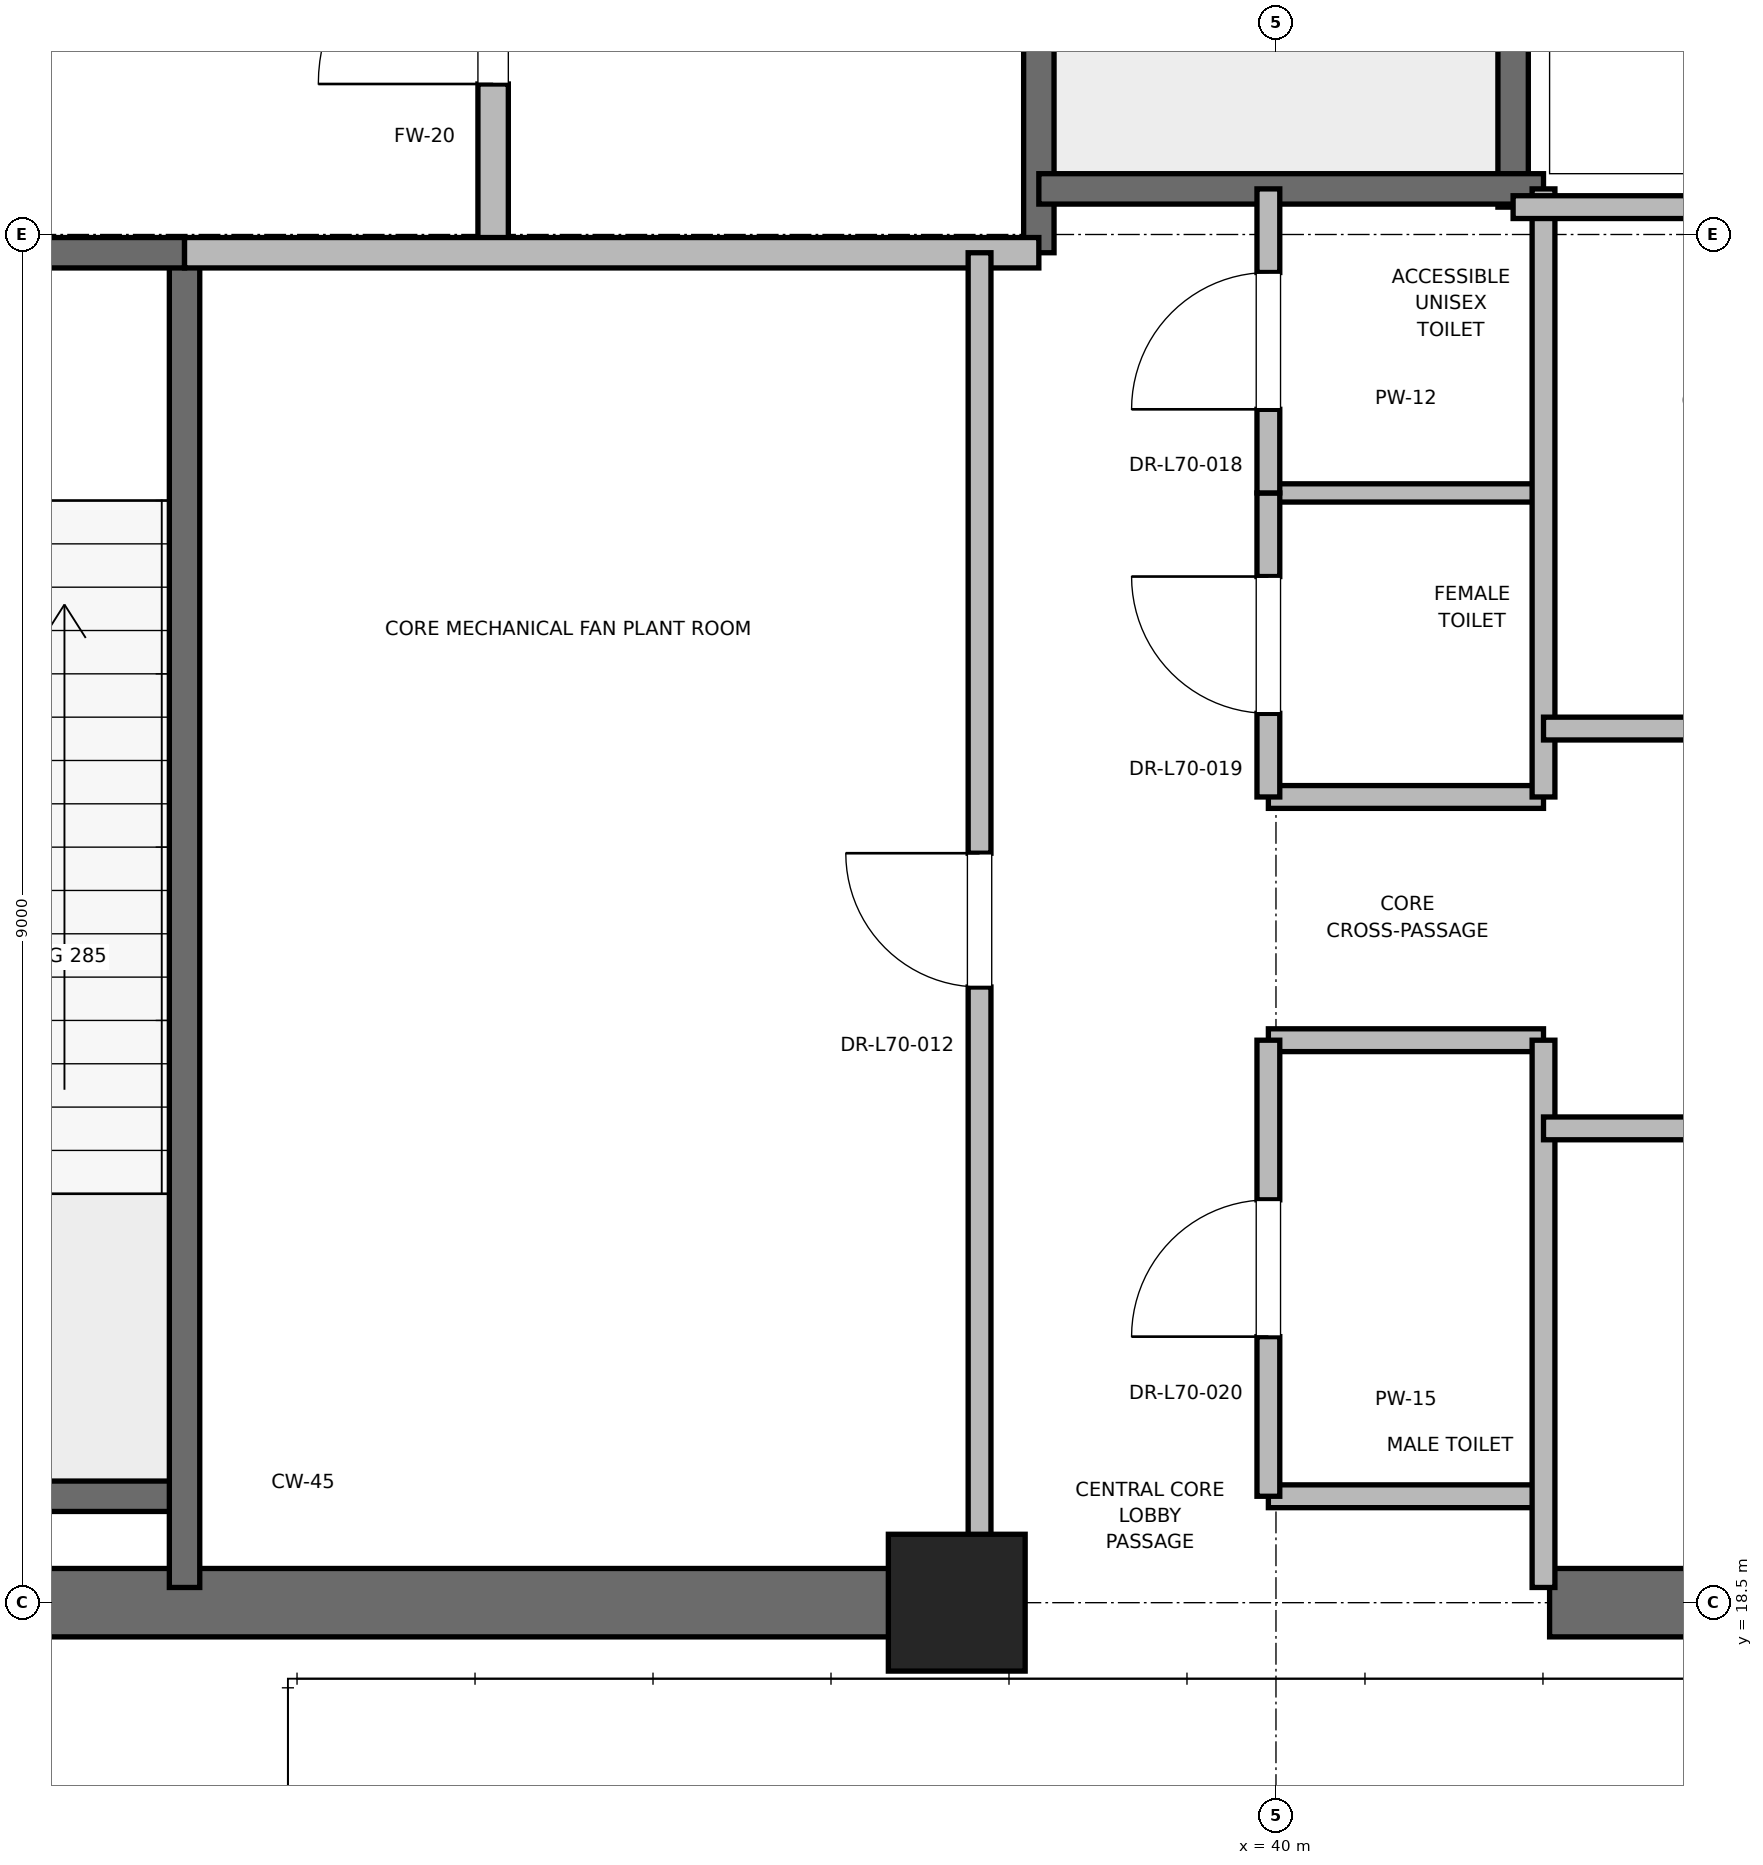
"""IFC4 building model, lengths in metres.
Left out: names, types, materials, properties, quantities, classifications, styles, units other than length and angle.
Written with IfcOpenShell. Run it as: python <this file> out.ifc"""

import sys

from ifc_helpers import new_model, si_unit, direction, frame, frame_2d, origin, origin_2d, place, context, subcontext, project, spatial, rectangle, extrude, element, fill, save


model = new_model("IFC4")
c1 = context("Model", 3, precision=1e-05, world=origin(), true_north=direction((0.0, 1.0)))
c2 = subcontext(c1, "Body", "Model", "MODEL_VIEW")
j1 = project(units=[si_unit("LENGTHUNIT", "METRE"), si_unit("PLANEANGLEUNIT", "RADIAN")], contexts=[c1])
p1 = place(None, origin())
s1 = spatial("IfcSite", under=j1, at=p1, CompositionType="ELEMENT")
p2 = place(p1, origin())
s2 = spatial("IfcBuilding", under=s1, at=p2, CompositionType="ELEMENT")
p3 = place(p2, frame((0.0, 0.0, 301.0)))
s3 = spatial("IfcBuildingStorey", under=s2, at=p3, CompositionType="ELEMENT", Elevation=301.0)
p4 = place(p3, frame((37.9, 18.5, 0.0), z_axis=(0.0, 0.0, 1.0), x_axis=(1.0, 0.0, 0.0)))
e1 = element("IfcColumn", 1, at=p4, inside=s3, PredefinedType="PILASTER", context=c2, shape_type="SweptSolid", body=[
    extrude(rectangle(XDim=0.9, YDim=0.9, at=origin_2d()), origin(), (0.0, 0.0, 1.0), 5.8),
])
for number, where, z_axis, x_axis in (
    (2, (29.0, 18.5, 0.0), (0.0, 0.0, 1.0), (1.0, 0.0, 0.0)),
    (3, (41.8, 18.5, 0.0), (0.0, 0.0, 1.0), (1.0, 0.0, 0.0)),
):
    element("IfcWall", number, at=place(p3, frame(where, z_axis=z_axis, x_axis=x_axis)), inside=s3, PredefinedType="SHEAR", context=c2, shape_type="SweptSolid", body=[
        extrude(rectangle(XDim=9.2, YDim=0.45, at=frame_2d((4.6, 0.0))), origin(), (0.0, 0.0, 1.0), 5.585),
    ])
p5 = place(p3, frame((29.7, 19.2, 0.0), z_axis=(0.0, 0.0, 1.0), x_axis=(1.0, 0.0, 0.0)))
e4 = element("IfcWall", 4, at=p5, inside=s3, PredefinedType="SOLIDWALL", context=c2, shape_type="SweptSolid", body=[
    extrude(rectangle(XDim=3.12, YDim=0.2, at=frame_2d((1.56, 0.0))), origin(), (0.0, 0.0, 1.0), 5.585),
])
p6 = place(p3, frame((32.82, 18.6, 0.0), z_axis=(0.0, 0.0, 1.0), x_axis=(0.0, 1.0, 0.0)))
e5 = element("IfcWall", 5, at=p6, inside=s3, PredefinedType="SOLIDWALL", context=c2, shape_type="SweptSolid", body=[
    extrude(rectangle(XDim=8.78, YDim=0.2, at=frame_2d((4.39, 0.0))), origin(), (0.0, 0.0, 1.0), 5.585),
])
p7 = place(p3, frame((29.7, 27.38, 0.0), z_axis=(0.0, 0.0, 1.0), x_axis=(1.0, 0.0, 0.0)))
e6 = element("IfcWall", 6, at=p7, inside=s3, PredefinedType="SOLIDWALL", context=c2, shape_type="SweptSolid", body=[
    extrude(rectangle(XDim=3.12, YDim=0.2, at=frame_2d((1.56, 0.0))), origin(), (0.0, 0.0, 1.0), 5.585),
])
p8 = place(p7, frame((1.01, 0.0, 0.0)))
e7 = element("IfcOpeningElement", 7, at=p8, cuts=e6, PredefinedType="OPENING", context=c2, shape_type="SweptSolid", body=[
    extrude(rectangle(XDim=1.1, YDim=2.15, at=frame_2d((0.55, 1.075))), frame((0.0, 0.1, 0.0), z_axis=(0.0, -1.0, 0.0), x_axis=(1.0, 0.0, 0.0)), (0.0, 0.0, 1.0), 0.2),
])
p9 = place(p3, frame((38.44, 27.38, 0.0), z_axis=(0.0, 0.0, 1.0), x_axis=(0.0, 1.0, 0.0)))
e8 = element("IfcWall", 8, at=p9, inside=s3, PredefinedType="SOLIDWALL", context=c2, shape_type="SweptSolid", body=[
    extrude(rectangle(XDim=8.87, YDim=0.2, at=frame_2d((4.435, 0.0))), origin(), (0.0, 0.0, 1.0), 5.585),
])
p10 = place(p3, frame((41.56, 27.68, 0.0), z_axis=(0.0, 0.0, 1.0), x_axis=(0.0, 1.0, 0.0)))
e9 = element("IfcWall", 9, at=p10, inside=s3, PredefinedType="SOLIDWALL", context=c2, shape_type="SweptSolid", body=[
    extrude(rectangle(XDim=8.57, YDim=0.2, at=frame_2d((4.285, 0.0))), origin(), (0.0, 0.0, 1.0), 5.585),
])
p11 = place(p3, frame((38.44, 27.8, 0.0), z_axis=(0.0, 0.0, 1.0), x_axis=(1.0, 0.0, 0.0)))
e10 = element("IfcWall", 10, at=p11, inside=s3, PredefinedType="SOLIDWALL", context=c2, shape_type="SweptSolid", body=[
    extrude(rectangle(XDim=3.32, YDim=0.2, at=frame_2d((1.66, 0.0))), origin(), (0.0, 0.0, 1.0), 5.585),
])
p12 = place(p3, frame((34.85, 27.38, 0.0), z_axis=(0.0, 0.0, 1.0), x_axis=(0.0, 1.0, 0.0)))
e11 = element("IfcWall", 11, at=p12, inside=s3, PredefinedType="PARTITIONING", context=c2, shape_type="SweptSolid", body=[
    extrude(rectangle(XDim=3.37, YDim=0.2, at=frame_2d((1.685, 0.0))), origin(), (0.0, 0.0, 1.0), 5.585),
])
p13 = place(p12, frame((1.11, 0.0, 0.0)))
e12 = element("IfcOpeningElement", 12, at=p13, cuts=e11, PredefinedType="OPENING", context=c2, shape_type="SweptSolid", body=[
    extrude(rectangle(XDim=1.15, YDim=2.2, at=frame_2d((0.575, 1.1))), frame((0.0, 0.1, 0.0), z_axis=(0.0, -1.0, 0.0), x_axis=(1.0, 0.0, 0.0)), (0.0, 0.0, 1.0), 0.2),
])
p14 = place(p3, frame((32.82, 27.38, 0.0), z_axis=(0.0, 0.0, 1.0), x_axis=(1.0, 0.0, 0.0)))
e13 = element("IfcWall", 13, at=p14, inside=s3, PredefinedType="PARTITIONING", context=c2, shape_type="SweptSolid", body=[
    extrude(rectangle(XDim=5.62, YDim=0.2, at=frame_2d((2.81, 0.0))), origin(), (0.0, 0.0, 1.0), 5.585),
])
for number, where, z_axis, x_axis in (
    (14, (39.95, 19.2, 0.0), (0.0, 0.0, 1.0), (1.0, 0.0, 0.0)),
    (15, (39.95, 22.2, 0.0), (0.0, 0.0, 1.0), (1.0, 0.0, 0.0)),
    (16, (39.95, 23.8, 0.0), (0.0, 0.0, 1.0), (1.0, 0.0, 0.0)),
):
    element("IfcWall", number, at=place(p3, frame(where, z_axis=z_axis, x_axis=x_axis)), inside=s3, PredefinedType="PARTITIONING", context=c2, shape_type="SweptSolid", body=[
        extrude(rectangle(XDim=1.81, YDim=0.15, at=frame_2d((0.905, 0.0))), origin(), (0.0, 0.0, 1.0), 2.85),
    ])
p15 = place(p3, frame((39.95, 25.8, 0.0), z_axis=(0.0, 0.0, 1.0), x_axis=(1.0, 0.0, 0.0)))
e17 = element("IfcWall", 17, at=p15, inside=s3, PredefinedType="PARTITIONING", context=c2, shape_type="SweptSolid", body=[
    extrude(rectangle(XDim=1.81, YDim=0.12, at=frame_2d((0.905, 0.0))), origin(), (0.0, 0.0, 1.0), 2.85),
])
p16 = place(p3, frame((41.76, 18.6, 0.0), z_axis=(0.0, 0.0, 1.0), x_axis=(0.0, 1.0, 0.0)))
e18 = element("IfcWall", 18, at=p16, inside=s3, PredefinedType="PARTITIONING", context=c2, shape_type="SweptSolid", body=[
    extrude(rectangle(XDim=3.6, YDim=0.15, at=frame_2d((1.8, 0.0))), origin(), (0.0, 0.0, 1.0), 2.85),
])
p17 = place(p3, frame((41.76, 23.8, 0.0), z_axis=(0.0, 0.0, 1.0), x_axis=(0.0, 1.0, 0.0)))
e19 = element("IfcWall", 19, at=p17, inside=s3, PredefinedType="PARTITIONING", context=c2, shape_type="SweptSolid", body=[
    extrude(rectangle(XDim=4.0, YDim=0.15, at=frame_2d((2.0, 0.0))), origin(), (0.0, 0.0, 1.0), 2.85),
])
p18 = place(p3, frame((39.95, 19.2, 0.0), z_axis=(0.0, 0.0, 1.0), x_axis=(0.0, 1.0, 0.0)))
e20 = element("IfcWall", 20, at=p18, inside=s3, PredefinedType="PARTITIONING", context=c2, shape_type="SweptSolid", body=[
    extrude(rectangle(XDim=3.0, YDim=0.15, at=frame_2d((1.5, 0.0))), origin(), (0.0, 0.0, 1.0), 2.85),
])
p19 = place(p18, frame((1.05, 0.0, 0.0)))
e21 = element("IfcOpeningElement", 21, at=p19, cuts=e20, PredefinedType="OPENING", context=c2, shape_type="SweptSolid", body=[
    extrude(rectangle(XDim=0.9, YDim=2.1, at=frame_2d((0.45, 1.05))), frame((0.0, 0.075, 0.0), z_axis=(0.0, -1.0, 0.0), x_axis=(1.0, 0.0, 0.0)), (0.0, 0.0, 1.0), 0.15),
])
p20 = place(p3, frame((39.95, 23.8, 0.0), z_axis=(0.0, 0.0, 1.0), x_axis=(0.0, 1.0, 0.0)))
e22 = element("IfcWall", 22, at=p20, inside=s3, PredefinedType="PARTITIONING", context=c2, shape_type="SweptSolid", body=[
    extrude(rectangle(XDim=2.0, YDim=0.15, at=frame_2d((1.0, 0.0))), origin(), (0.0, 0.0, 1.0), 2.85),
])
p21 = place(p20, frame((0.55, 0.0, 0.0)))
e23 = element("IfcOpeningElement", 23, at=p21, cuts=e22, PredefinedType="OPENING", context=c2, shape_type="SweptSolid", body=[
    extrude(rectangle(XDim=0.9, YDim=2.1, at=frame_2d((0.45, 1.05))), frame((0.0, 0.075, 0.0), z_axis=(0.0, -1.0, 0.0), x_axis=(1.0, 0.0, 0.0)), (0.0, 0.0, 1.0), 0.15),
])
p22 = place(p3, frame((39.95, 25.8, 0.0), z_axis=(0.0, 0.0, 1.0), x_axis=(0.0, 1.0, 0.0)))
e24 = element("IfcWall", 24, at=p22, inside=s3, PredefinedType="PARTITIONING", context=c2, shape_type="SweptSolid", body=[
    extrude(rectangle(XDim=2.0, YDim=0.15, at=frame_2d((1.0, 0.0))), origin(), (0.0, 0.0, 1.0), 2.85),
])
p23 = place(p22, frame((0.55, 0.0, 0.0)))
e25 = element("IfcOpeningElement", 25, at=p23, cuts=e24, PredefinedType="OPENING", context=c2, shape_type="SweptSolid", body=[
    extrude(rectangle(XDim=0.9, YDim=2.1, at=frame_2d((0.45, 1.05))), frame((0.0, 0.075, 0.0), z_axis=(0.0, -1.0, 0.0), x_axis=(1.0, 0.0, 0.0)), (0.0, 0.0, 1.0), 0.15),
])
p24 = place(p3, frame((38.05, 18.6, 0.0), z_axis=(0.0, 0.0, 1.0), x_axis=(0.0, 1.0, 0.0)))
e26 = element("IfcWall", 26, at=p24, inside=s3, PredefinedType="PARTITIONING", context=c2, shape_type="SweptSolid", body=[
    extrude(rectangle(XDim=8.78, YDim=0.15, at=frame_2d((4.39, 0.0))), origin(), (0.0, 0.0, 1.0), 2.85),
])
p25 = place(p24, frame((3.95, 0.0, 0.0)))
e27 = element("IfcOpeningElement", 27, at=p25, cuts=e26, PredefinedType="OPENING", context=c2, shape_type="SweptSolid", body=[
    extrude(rectangle(XDim=0.88, YDim=2.1, at=frame_2d((0.44, 1.05))), frame((0.0, 0.075, 0.0), z_axis=(0.0, -1.0, 0.0), x_axis=(1.0, 0.0, 0.0)), (0.0, 0.0, 1.0), 0.15),
])
p26 = place(p3, frame((41.56, 27.68, 0.0), z_axis=(0.0, 0.0, 1.0), x_axis=(1.0, 0.0, 0.0)))
e28 = element("IfcWall", 28, at=p26, inside=s3, PredefinedType="PARTITIONING", context=c2, shape_type="SweptSolid", body=[
    extrude(rectangle(XDim=3.59, YDim=0.15, at=frame_2d((1.795, 0.0))), origin(), (0.0, 0.0, 1.0), 2.85),
])
p27 = place(p3, frame((41.76, 21.62, 0.0), z_axis=(0.0, 0.0, 1.0), x_axis=(1.0, 0.0, 0.0)))
e29 = element("IfcWall", 29, at=p27, inside=s3, PredefinedType="PARTITIONING", context=c2, shape_type="SweptSolid", body=[
    extrude(rectangle(XDim=5.98, YDim=0.15, at=frame_2d((2.99, 0.0))), origin(), (0.0, 0.0, 1.0), 2.85),
])
p28 = place(p27, frame((2.55, 0.0, 0.0)))
e30 = element("IfcOpeningElement", 30, at=p28, cuts=e29, PredefinedType="OPENING", context=c2, shape_type="SweptSolid", body=[
    extrude(rectangle(XDim=0.88, YDim=2.1, at=frame_2d((0.44, 1.05))), frame((0.0, 0.075, 0.0), z_axis=(0.0, -1.0, 0.0), x_axis=(1.0, 0.0, 0.0)), (0.0, 0.0, 1.0), 0.15),
])
p29 = place(p3, frame((41.76, 24.25, 0.0), z_axis=(0.0, 0.0, 1.0), x_axis=(1.0, 0.0, 0.0)))
e31 = element("IfcWall", 31, at=p29, inside=s3, PredefinedType="PARTITIONING", context=c2, shape_type="SweptSolid", body=[
    extrude(rectangle(XDim=3.39, YDim=0.15, at=frame_2d((1.695, 0.0))), origin(), (0.0, 0.0, 1.0), 2.85),
])
p30 = place(p29, frame((1.255, 0.0, 0.0)))
e32 = element("IfcOpeningElement", 32, at=p30, cuts=e31, PredefinedType="OPENING", context=c2, shape_type="SweptSolid", body=[
    extrude(rectangle(XDim=0.88, YDim=2.1, at=frame_2d((0.44, 1.05))), frame((0.0, 0.075, 0.0), z_axis=(0.0, -1.0, 0.0), x_axis=(1.0, 0.0, 0.0)), (0.0, 0.0, 1.0), 0.15),
])
p31 = place(p13, origin())
e33 = element("IfcDoor", 33, at=p31, inside=s3, OperationType="SINGLE_SWING_LEFT", PredefinedType="DOOR", context=c2, shape_type="SweptSolid", body=[
    extrude(rectangle(XDim=1.15, YDim=2.2, at=frame_2d((0.575, 1.1))), frame((0.0, 0.025, 0.0), z_axis=(0.0, -1.0, 0.0), x_axis=(1.0, 0.0, 0.0)), (0.0, 0.0, 1.0), 0.05),
])
fill(e12, e33)
p32 = place(p19, origin())
e34 = element("IfcDoor", 34, at=p32, inside=s3, OperationType="SINGLE_SWING_LEFT", PredefinedType="DOOR", context=c2, shape_type="SweptSolid", body=[
    extrude(rectangle(XDim=0.9, YDim=2.1, at=frame_2d((0.45, 1.05))), frame((0.0, 0.025, 0.0), z_axis=(0.0, -1.0, 0.0), x_axis=(1.0, 0.0, 0.0)), (0.0, 0.0, 1.0), 0.05),
])
fill(e21, e34)
p33 = place(p21, origin())
e35 = element("IfcDoor", 35, at=p33, inside=s3, OperationType="SINGLE_SWING_RIGHT", PredefinedType="DOOR", context=c2, shape_type="SweptSolid", body=[
    extrude(rectangle(XDim=0.9, YDim=2.1, at=frame_2d((0.45, 1.05))), frame((0.0, 0.025, 0.0), z_axis=(0.0, -1.0, 0.0), x_axis=(1.0, 0.0, 0.0)), (0.0, 0.0, 1.0), 0.05),
])
fill(e23, e35)
p34 = place(p23, origin())
e36 = element("IfcDoor", 36, at=p34, inside=s3, OperationType="SINGLE_SWING_LEFT", PredefinedType="DOOR", context=c2, shape_type="SweptSolid", body=[
    extrude(rectangle(XDim=0.9, YDim=2.1, at=frame_2d((0.45, 1.05))), frame((0.0, 0.025, 0.0), z_axis=(0.0, -1.0, 0.0), x_axis=(1.0, 0.0, 0.0)), (0.0, 0.0, 1.0), 0.05),
])
fill(e25, e36)
p35 = place(p25, origin())
e37 = element("IfcDoor", 37, at=p35, inside=s3, OperationType="SINGLE_SWING_RIGHT", PredefinedType="DOOR", context=c2, shape_type="SweptSolid", body=[
    extrude(rectangle(XDim=0.88, YDim=2.1, at=frame_2d((0.44, 1.05))), frame((0.0, 0.025, 0.0), z_axis=(0.0, -1.0, 0.0), x_axis=(1.0, 0.0, 0.0)), (0.0, 0.0, 1.0), 0.05),
])
fill(e27, e37)
save(model, sys.argv[1])
